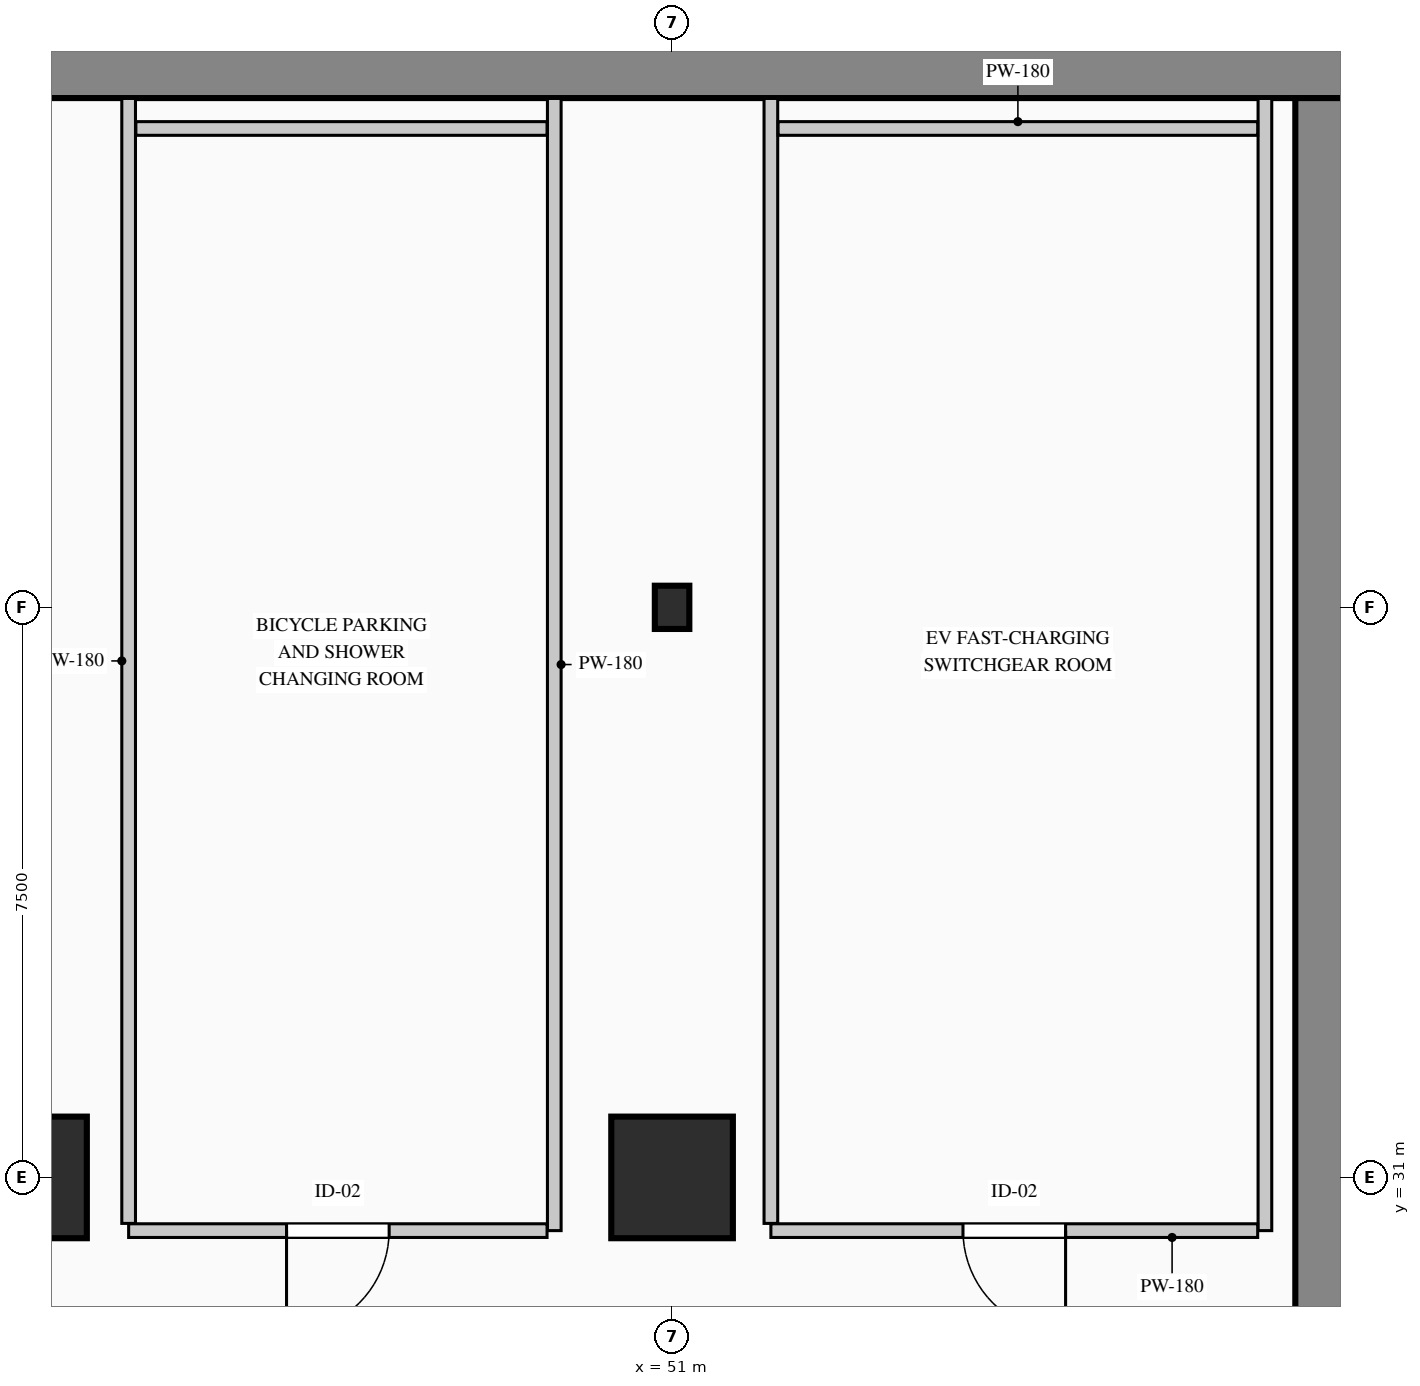
"""IFC4 building model, lengths in metres.
Left out: names, types, materials, properties, quantities, classifications, styles, units other than length and angle.
Written with IfcOpenShell. Run it as: python <this file> out.ifc"""

import sys

from ifc_helpers import new_model, si_unit, direction, frame, frame_2d, origin, origin_2d, place, context, subcontext, project, spatial, rectangle, i_section, extrude, element, fill, save


model = new_model("IFC4")
c1 = context("Model", 3, precision=1e-05, world=origin(), true_north=direction((0.0, 1.0)))
c2 = subcontext(c1, "Body", "Model", "MODEL_VIEW")
j1 = project(units=[si_unit("LENGTHUNIT", "METRE"), si_unit("PLANEANGLEUNIT", "RADIAN")], contexts=[c1])
p1 = place(None, origin())
s1 = spatial("IfcSite", under=j1, at=p1, CompositionType="ELEMENT")
p2 = place(p1, origin())
s2 = spatial("IfcBuilding", under=s1, at=p2, CompositionType="ELEMENT")
p3 = place(p2, frame((0.0, 0.0, -4.5)))
s3 = spatial("IfcBuildingStorey", under=s2, at=p3, CompositionType="ELEMENT", Elevation=-4.5)
p4 = place(p3, frame((0.0, 45.6, 0.0), z_axis=(0.0, 0.0, 1.0), x_axis=(1.0, 0.0, 0.0)))
e1 = element("IfcWall", 1, at=p4, inside=s3, PredefinedType="USERDEFINED", context=c2, shape_type="SweptSolid", body=[
    extrude(rectangle(XDim=60.0, YDim=0.8, at=frame_2d((30.0, 0.0))), origin(), (0.0, 0.0, 1.0), 4.5),
])
p5 = place(p3, frame((59.6, 0.8, 0.0), z_axis=(0.0, 0.0, 1.0), x_axis=(0.0, 1.0, 0.0)))
e2 = element("IfcWall", 2, at=p5, inside=s3, PredefinedType="USERDEFINED", context=c2, shape_type="SweptSolid", body=[
    extrude(rectangle(XDim=44.4, YDim=0.8, at=frame_2d((22.2, 0.0))), origin(), (0.0, 0.0, 1.0), 4.5),
])
for number, where, z_axis, x_axis in (
    (3, (42.5, 31.0, 0.0), (0.0, 0.0, 1.0), (1.0, 0.0, 0.0)),
    (4, (51.0, 31.0, 0.0), (0.0, 0.0, 1.0), (1.0, 0.0, 0.0)),
):
    element("IfcColumn", number, at=place(p3, frame(where, z_axis=z_axis, x_axis=x_axis)), inside=s3, PredefinedType="COLUMN", context=c2, shape_type="SweptSolid", body=[
        extrude(rectangle(XDim=1.6, YDim=1.6, at=origin_2d()), origin(), (0.0, 0.0, 1.0), 4.5),
    ])
p6 = place(p3, frame((51.0, 38.5, 0.0), z_axis=(0.0, 0.0, 1.0), x_axis=(1.0, 0.0, 0.0)))
e5 = element("IfcColumn", 5, at=p6, inside=s3, PredefinedType="COLUMN", context=c2, shape_type="SweptSolid", body=[
    extrude(i_section(OverallWidth=0.454, OverallDepth=0.569, WebThickness=0.078, FlangeThickness=0.08, FilletRadius=0.015, at=origin_2d()), origin(), (0.0, 0.0, 1.0), 4.5),
])
p7 = place(p3, frame((58.8, 45.195, 0.0), z_axis=(0.0, 0.0, 1.0), x_axis=(0.0, -1.0, 0.0)))
e6 = element("IfcWall", 6, at=p7, inside=s3, PredefinedType="PARTITIONING", context=c2, shape_type="SweptSolid", body=[
    extrude(rectangle(XDim=14.895, YDim=0.18, at=frame_2d((7.448, 0.0))), origin(), (0.0, 0.0, 1.0), 4.165),
])
p8 = place(p3, frame((58.705, 30.3, 0.0), z_axis=(0.0, 0.0, 1.0), x_axis=(-1.0, 0.0, 0.0)))
e7 = element("IfcWall", 7, at=p8, inside=s3, PredefinedType="PARTITIONING", context=c2, shape_type="SweptSolid", body=[
    extrude(rectangle(XDim=6.405, YDim=0.18, at=frame_2d((3.203, 0.0))), origin(), (0.0, 0.0, 1.0), 4.165),
])
p9 = place(p8, frame((2.528, 0.0, 0.0)))
e8 = element("IfcOpeningElement", 8, at=p9, cuts=e7, PredefinedType="OPENING", context=c2, shape_type="SweptSolid", body=[
    extrude(rectangle(XDim=1.35, YDim=2.2, at=frame_2d((0.675, 1.1))), frame((0.0, 0.1, 0.0), z_axis=(0.0, -1.0, 0.0), x_axis=(1.0, 0.0, 0.0)), (0.0, 0.0, 1.0), 0.2),
])
p10 = place(p3, frame((52.3, 30.395, 0.0), z_axis=(0.0, 0.0, 1.0), x_axis=(0.0, 1.0, 0.0)))
e9 = element("IfcWall", 9, at=p10, inside=s3, PredefinedType="PARTITIONING", context=c2, shape_type="SweptSolid", body=[
    extrude(rectangle(XDim=14.8, YDim=0.18, at=frame_2d((7.4, 0.0))), origin(), (0.0, 0.0, 1.0), 4.165),
])
p11 = place(p3, frame((52.395, 44.8, 0.0), z_axis=(0.0, 0.0, 1.0), x_axis=(1.0, 0.0, 0.0)))
e10 = element("IfcWall", 10, at=p11, inside=s3, PredefinedType="PARTITIONING", context=c2, shape_type="SweptSolid", body=[
    extrude(rectangle(XDim=6.31, YDim=0.18, at=frame_2d((3.155, 0.0))), origin(), (0.0, 0.0, 1.0), 4.165),
])
p12 = place(p3, frame((49.45, 45.195, 0.0), z_axis=(0.0, 0.0, 1.0), x_axis=(0.0, -1.0, 0.0)))
e11 = element("IfcWall", 11, at=p12, inside=s3, PredefinedType="PARTITIONING", context=c2, shape_type="SweptSolid", body=[
    extrude(rectangle(XDim=14.895, YDim=0.18, at=frame_2d((7.448, 0.0))), origin(), (0.0, 0.0, 1.0), 3.55),
])
p13 = place(p3, frame((49.355, 30.3, 0.0), z_axis=(0.0, 0.0, 1.0), x_axis=(-1.0, 0.0, 0.0)))
e12 = element("IfcWall", 12, at=p13, inside=s3, PredefinedType="PARTITIONING", context=c2, shape_type="SweptSolid", body=[
    extrude(rectangle(XDim=5.505, YDim=0.18, at=frame_2d((2.752, 0.0))), origin(), (0.0, 0.0, 1.0), 4.165),
])
p14 = place(p13, frame((2.077, 0.0, 0.0)))
e13 = element("IfcOpeningElement", 13, at=p14, cuts=e12, PredefinedType="OPENING", context=c2, shape_type="SweptSolid", body=[
    extrude(rectangle(XDim=1.35, YDim=2.2, at=frame_2d((0.675, 1.1))), frame((0.0, 0.1, 0.0), z_axis=(0.0, -1.0, 0.0), x_axis=(1.0, 0.0, 0.0)), (0.0, 0.0, 1.0), 0.2),
])
p15 = place(p3, frame((43.85, 30.395, 0.0), z_axis=(0.0, 0.0, 1.0), x_axis=(0.0, 1.0, 0.0)))
e14 = element("IfcWall", 14, at=p15, inside=s3, PredefinedType="PARTITIONING", context=c2, shape_type="SweptSolid", body=[
    extrude(rectangle(XDim=14.8, YDim=0.18, at=frame_2d((7.4, 0.0))), origin(), (0.0, 0.0, 1.0), 4.165),
])
p16 = place(p3, frame((43.945, 44.8, 0.0), z_axis=(0.0, 0.0, 1.0), x_axis=(1.0, 0.0, 0.0)))
e15 = element("IfcWall", 15, at=p16, inside=s3, PredefinedType="PARTITIONING", context=c2, shape_type="SweptSolid", body=[
    extrude(rectangle(XDim=5.41, YDim=0.18, at=frame_2d((2.705, 0.0))), origin(), (0.0, 0.0, 1.0), 4.165),
])
p17 = place(p9, origin())
e16 = element("IfcDoor", 16, at=p17, inside=s3, OperationType="SINGLE_SWING_LEFT", PredefinedType="DOOR", context=c2, shape_type="SweptSolid", body=[
    extrude(rectangle(XDim=1.35, YDim=2.2, at=frame_2d((0.675, 1.1))), frame((0.0, 0.025, 0.0), z_axis=(0.0, -1.0, 0.0), x_axis=(1.0, 0.0, 0.0)), (0.0, 0.0, 1.0), 0.05),
])
fill(e8, e16)
p18 = place(p14, origin())
e17 = element("IfcDoor", 17, at=p18, inside=s3, OperationType="SINGLE_SWING_RIGHT", PredefinedType="DOOR", context=c2, shape_type="SweptSolid", body=[
    extrude(rectangle(XDim=1.35, YDim=2.2, at=frame_2d((0.675, 1.1))), frame((0.0, 0.025, 0.0), z_axis=(0.0, -1.0, 0.0), x_axis=(1.0, 0.0, 0.0)), (0.0, 0.0, 1.0), 0.05),
])
fill(e13, e17)
save(model, sys.argv[1])
